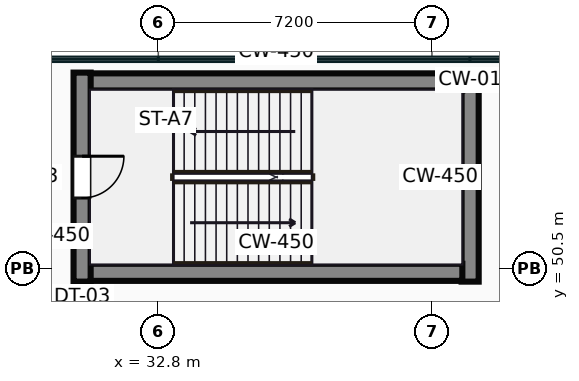
"""IFC4 building model, lengths in metres.
Left out: names, types, materials, properties, quantities, classifications, styles, units other than length and angle.
Written with IfcOpenShell. Run it as: python <this file> out.ifc"""

import sys

from ifc_helpers import new_model, si_unit, direction, frame, frame_2d, origin, place, context, subcontext, project, spatial, rectangle, extrude, source, transform, mapped, element, fill, save


model = new_model("IFC4")
c1 = context("Model", 3, precision=1e-05, world=origin(), true_north=direction((0.0, 1.0)))
c2 = subcontext(c1, "Body", "Model", "MODEL_VIEW")
j1 = project(units=[si_unit("LENGTHUNIT", "METRE"), si_unit("PLANEANGLEUNIT", "RADIAN")], contexts=[c1])
p1 = place(None, origin())
s1 = spatial("IfcSite", under=j1, at=p1, CompositionType="ELEMENT")
p2 = place(p1, origin())
s2 = spatial("IfcBuilding", under=s1, at=p2, CompositionType="ELEMENT")
p3 = place(p2, frame((0.0, 0.0, 16.0)))
s3 = spatial("IfcBuildingStorey", under=s2, at=p3, CompositionType="ELEMENT", Elevation=16.0)
m1 = source(origin(), c2, "Body", "SweptSolid", [
    extrude(rectangle(XDim=5.5, YDim=0.45, at=frame_2d((2.75, 0.0))), origin(), (0.0, 0.0, 1.0), 5.0),
])
p4 = place(p3, frame((30.795, 50.15, 0.0), z_axis=(0.0, 0.0, 1.0), x_axis=(0.0, 1.0, 0.0)))
e1 = element("IfcWall", 1, at=p4, inside=s3, PredefinedType="SHEAR", context=c2, shape_type="MappedRepresentation", body=[
    mapped(m1, transform((0.0, 0.0, 0.0))),
])
p5 = place(p4, frame((2.2, 0.0, 0.0)))
e2 = element("IfcOpeningElement", 2, at=p5, cuts=e1, PredefinedType="OPENING", context=c2, shape_type="SweptSolid", body=[
    extrude(rectangle(XDim=1.1, YDim=2.15, at=frame_2d((0.55, 1.075))), frame((0.0, 0.235, 0.0), z_axis=(0.0, -1.0, 0.0), x_axis=(1.0, 0.0, 0.0)), (0.0, 0.0, 1.0), 0.47),
])
m2 = source(origin(), c2, "Body", "SweptSolid", [
    extrude(rectangle(XDim=9.8, YDim=0.45, at=frame_2d((4.9, 0.0))), origin(), (0.0, 0.0, 1.0), 5.0),
])
for number, where, z_axis, x_axis in (
    (3, (31.0, 50.395, 0.0), (0.0, 0.0, 1.0), (1.0, 0.0, 0.0)),
    (4, (31.0, 55.405, 0.0), (0.0, 0.0, 1.0), (1.0, 0.0, 0.0)),
):
    element("IfcWall", number, at=place(p3, frame(where, z_axis=z_axis, x_axis=x_axis)), inside=s3, PredefinedType="SHEAR", context=c2, shape_type="MappedRepresentation", body=[
        mapped(m2, transform((0.0, 0.0, 0.0))),
    ])
p6 = place(p3, frame((41.005, 50.15, 0.0), z_axis=(0.0, 0.0, 1.0), x_axis=(0.0, 1.0, 0.0)))
e5 = element("IfcWall", 5, at=p6, inside=s3, PredefinedType="SHEAR", context=c2, shape_type="MappedRepresentation", body=[
    mapped(m1, transform((0.0, 0.0, 0.0))),
])
m3 = source(origin(), c2, "Body", "SweptSolid", [
    extrude(rectangle(XDim=1.1, YDim=2.15, at=frame_2d((0.55, 1.075))), frame((0.0, 0.025, 0.0), z_axis=(0.0, -1.0, 0.0), x_axis=(1.0, 0.0, 0.0)), (0.0, 0.0, 1.0), 0.05),
])
p7 = place(p5, frame((1.1, 0.0, 0.0), z_axis=(0.0, 0.0, 1.0), x_axis=(-1.0, 0.0, 0.0)))
e6 = element("IfcDoor", 6, at=p7, inside=s3, OperationType="SINGLE_SWING_RIGHT", PredefinedType="DOOR", context=c2, shape_type="MappedRepresentation", body=[
    mapped(m3, transform((0.0, 0.0, 0.0))),
])
fill(e2, e6)
save(model, sys.argv[1])
